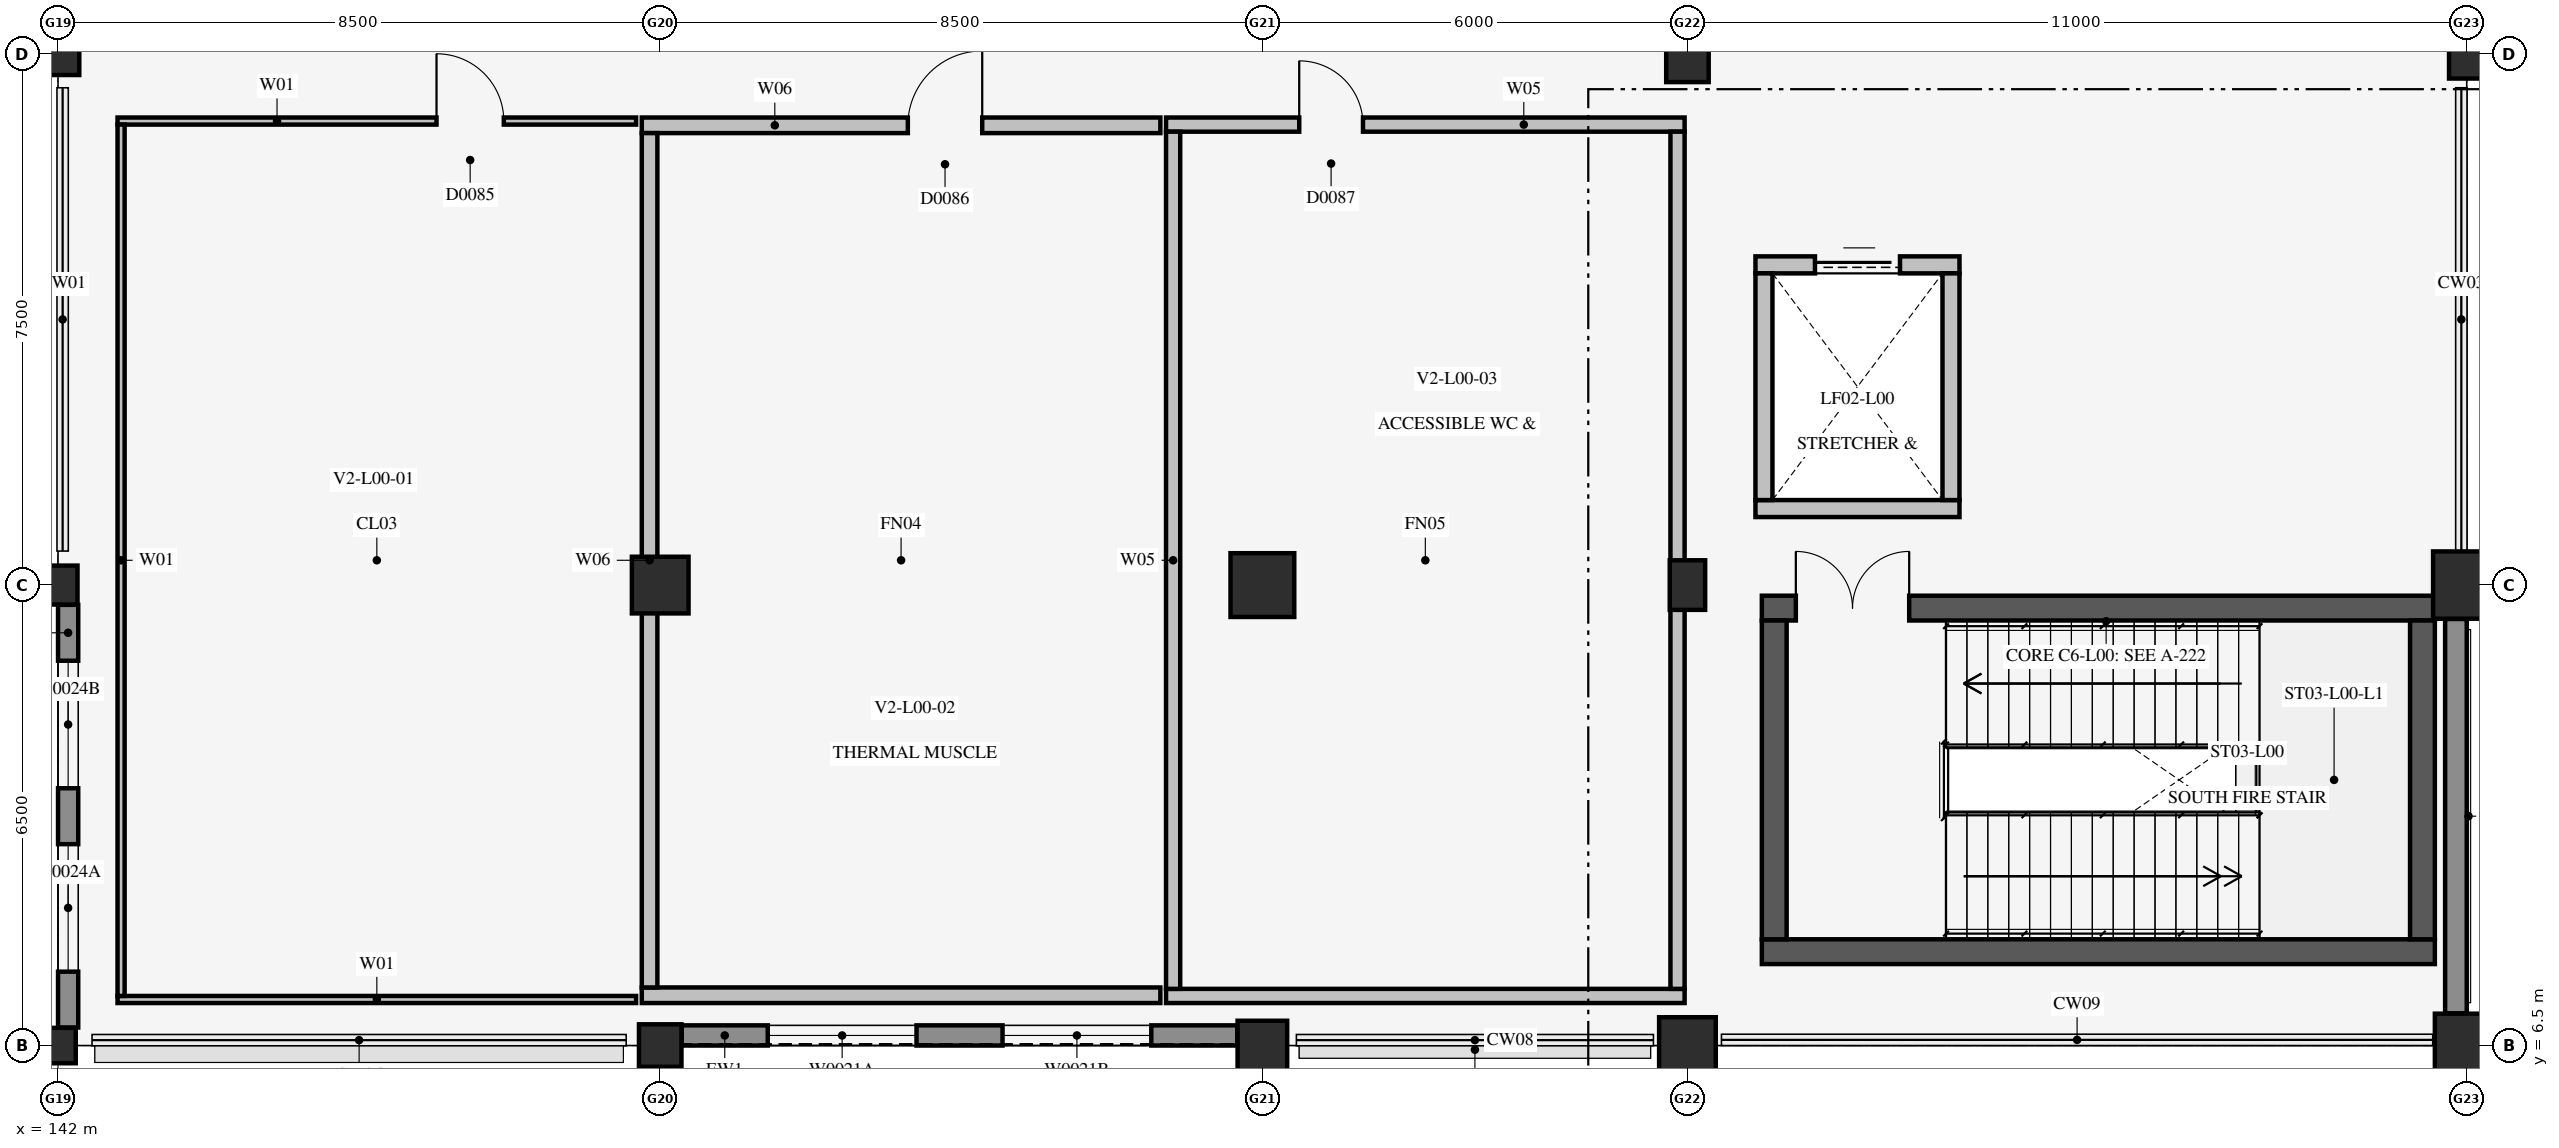
"""IFC4 building model, lengths in metres.
Left out: names, types, materials, properties, quantities, classifications, styles, units other than length and angle.
Written with IfcOpenShell. Run it as: python <this file> out.ifc"""

import sys

from ifc_helpers import new_model, si_unit, direction, frame, frame_2d, origin, origin_2d, place, context, subcontext, project, spatial, rectangle, extrude, element, fill, save


model = new_model("IFC4")
c1 = context("Model", 3, precision=1e-05, world=origin(), true_north=direction((0.0, 1.0)))
c2 = subcontext(c1, "Body", "Model", "MODEL_VIEW")
j1 = project(units=[si_unit("LENGTHUNIT", "METRE"), si_unit("PLANEANGLEUNIT", "RADIAN")], contexts=[c1])
p1 = place(None, origin())
s1 = spatial("IfcSite", under=j1, at=p1, CompositionType="ELEMENT")
p2 = place(p1, origin())
s2 = spatial("IfcBuilding", under=s1, at=p2, CompositionType="ELEMENT")
p3 = place(p2, origin())
s3 = spatial("IfcBuildingStorey", under=s2, at=p3, CompositionType="ELEMENT", Elevation=0.0)
p4 = place(p3, frame((166.05, 7.825, 0.0), z_axis=(0.0, 0.0, 1.0), x_axis=(1.0, 0.0, 0.0)))
e1 = element("IfcWall", 1, at=p4, inside=s3, PredefinedType="SHEAR", context=c2, shape_type="SweptSolid", body=[
    extrude(rectangle(XDim=9.5, YDim=0.35, at=frame_2d((4.75, 0.0))), origin(), (0.0, 0.0, 1.0), 5.14),
])
p5 = place(p3, frame((166.05, 12.675, 0.0), z_axis=(0.0, 0.0, 1.0), x_axis=(1.0, 0.0, 0.0)))
e2 = element("IfcWall", 2, at=p5, inside=s3, PredefinedType="SHEAR", context=c2, shape_type="SweptSolid", body=[
    extrude(rectangle(XDim=9.5, YDim=0.35, at=frame_2d((4.75, 0.0))), origin(), (0.0, 0.0, 1.0), 5.14),
])
p6 = place(p5, frame((0.48, 0.0, 0.0)))
e3 = element("IfcOpeningElement", 3, at=p6, cuts=e2, PredefinedType="OPENING", context=c2, shape_type="SweptSolid", body=[
    extrude(rectangle(XDim=1.6, YDim=2.2, at=frame_2d((0.8, 1.1))), frame((0.0, 0.187, 0.0), z_axis=(0.0, -1.0, 0.0), x_axis=(1.0, 0.0, 0.0)), (0.0, 0.0, 1.0), 0.374),
])
for number, where, z_axis, x_axis in (
    (4, (166.225, 8.0, 0.0), (0.0, 0.0, 1.0), (0.0, 1.0, 0.0)),
    (5, (175.375, 8.0, 0.0), (0.0, 0.0, 1.0), (0.0, 1.0, 0.0)),
):
    element("IfcWall", number, at=place(p3, frame(where, z_axis=z_axis, x_axis=x_axis)), inside=s3, PredefinedType="SHEAR", context=c2, shape_type="SweptSolid", body=[
        extrude(rectangle(XDim=4.5, YDim=0.35, at=frame_2d((2.25, 0.0))), origin(), (0.0, 0.0, 1.0), 5.14),
    ])
p7 = place(p3, frame((165.96, 14.08, 0.0), z_axis=(0.0, 0.0, 1.0), x_axis=(1.0, 0.0, 0.0)))
e6 = element("IfcWall", 6, at=p7, inside=s3, PredefinedType="SOLIDWALL", context=c2, shape_type="SweptSolid", body=[
    extrude(rectangle(XDim=2.88, YDim=0.24, at=frame_2d((1.44, 0.0))), origin(), (0.0, 0.0, 1.0), 5.4),
])
p8 = place(p3, frame((165.96, 17.52, 0.0), z_axis=(0.0, 0.0, 1.0), x_axis=(1.0, 0.0, 0.0)))
e7 = element("IfcWall", 7, at=p8, inside=s3, PredefinedType="SOLIDWALL", context=c2, shape_type="SweptSolid", body=[
    extrude(rectangle(XDim=2.88, YDim=0.24, at=frame_2d((1.44, 0.0))), origin(), (0.0, 0.0, 1.0), 5.4),
])
p9 = place(p8, frame((0.84, 0.0, 0.0)))
e8 = element("IfcOpeningElement", 8, at=p9, cuts=e7, PredefinedType="OPENING", context=c2, shape_type="SweptSolid", body=[
    extrude(rectangle(XDim=1.2, YDim=2.2, at=frame_2d((0.6, 1.1))), frame((0.0, 0.132, 0.0), z_axis=(0.0, -1.0, 0.0), x_axis=(1.0, 0.0, 0.0)), (0.0, 0.0, 1.0), 0.264),
])
for number, where, z_axis, x_axis in (
    (9, (166.08, 14.2, 0.0), (0.0, 0.0, 1.0), (0.0, 1.0, 0.0)),
    (10, (168.72, 14.2, 0.0), (0.0, 0.0, 1.0), (0.0, 1.0, 0.0)),
):
    element("IfcWall", number, at=place(p3, frame(where, z_axis=z_axis, x_axis=x_axis)), inside=s3, PredefinedType="SOLIDWALL", context=c2, shape_type="SweptSolid", body=[
        extrude(rectangle(XDim=3.2, YDim=0.24, at=frame_2d((1.6, 0.0))), origin(), (0.0, 0.0, 1.0), 5.4),
    ])
p10 = place(p3, frame((142.0, 6.5, 0.0), z_axis=(0.0, 0.0, 1.0), x_axis=(1.0, 0.0, 0.0)))
e11 = element("IfcColumn", 11, at=p10, inside=s3, PredefinedType="COLUMN", context=c2, shape_type="SweptSolid", body=[
    extrude(rectangle(XDim=0.5, YDim=0.5, at=origin_2d()), origin(), (0.0, 0.0, 1.0), 5.4),
])
p11 = place(p3, frame((142.0, 13.0, 0.0), z_axis=(0.0, 0.0, 1.0), x_axis=(1.0, 0.0, 0.0)))
e12 = element("IfcColumn", 12, at=p11, inside=s3, PredefinedType="COLUMN", context=c2, shape_type="SweptSolid", body=[
    extrude(rectangle(XDim=0.55, YDim=0.55, at=origin_2d()), origin(), (0.0, 0.0, 1.0), 5.4),
])
for number, where, z_axis, x_axis in (
    (13, (142.0, 20.5, 0.0), (0.0, 0.0, 1.0), (1.0, 0.0, 0.0)),
    (14, (150.5, 6.5, 0.0), (0.0, 0.0, 1.0), (1.0, 0.0, 0.0)),
):
    element("IfcColumn", number, at=place(p3, frame(where, z_axis=z_axis, x_axis=x_axis)), inside=s3, PredefinedType="COLUMN", context=c2, shape_type="SweptSolid", body=[
        extrude(rectangle(XDim=0.6, YDim=0.6, at=origin_2d()), origin(), (0.0, 0.0, 1.0), 5.4),
    ])
p12 = place(p3, frame((150.5, 13.0, 0.0), z_axis=(0.0, 0.0, 1.0), x_axis=(1.0, 0.0, 0.0)))
e15 = element("IfcColumn", 15, at=p12, inside=s3, PredefinedType="COLUMN", context=c2, shape_type="SweptSolid", body=[
    extrude(rectangle(XDim=0.8, YDim=0.8, at=origin_2d()), origin(), (0.0, 0.0, 1.0), 5.4),
])
p13 = place(p3, frame((159.0, 6.5, 0.0), z_axis=(0.0, 0.0, 1.0), x_axis=(1.0, 0.0, 0.0)))
e16 = element("IfcColumn", 16, at=p13, inside=s3, PredefinedType="COLUMN", context=c2, shape_type="SweptSolid", body=[
    extrude(rectangle(XDim=0.7, YDim=0.7, at=origin_2d()), origin(), (0.0, 0.0, 1.0), 5.4),
])
p14 = place(p3, frame((159.0, 13.0, 0.0), z_axis=(0.0, 0.0, 1.0), x_axis=(1.0, 0.0, 0.0)))
e17 = element("IfcColumn", 17, at=p14, inside=s3, PredefinedType="COLUMN", context=c2, shape_type="SweptSolid", body=[
    extrude(rectangle(XDim=0.9, YDim=0.9, at=origin_2d()), origin(), (0.0, 0.0, 1.0), 5.4),
])
p15 = place(p3, frame((165.0, 6.5, 0.0), z_axis=(0.0, 0.0, 1.0), x_axis=(1.0, 0.0, 0.0)))
e18 = element("IfcColumn", 18, at=p15, inside=s3, PredefinedType="COLUMN", context=c2, shape_type="SweptSolid", body=[
    extrude(rectangle(XDim=0.8, YDim=0.8, at=origin_2d()), origin(), (0.0, 0.0, 1.0), 5.4),
])
p16 = place(p3, frame((165.0, 13.0, 0.0), z_axis=(0.0, 0.0, 1.0), x_axis=(1.0, 0.0, 0.0)))
e19 = element("IfcColumn", 19, at=p16, inside=s3, PredefinedType="COLUMN", context=c2, shape_type="SweptSolid", body=[
    extrude(rectangle(XDim=0.5, YDim=0.7, at=origin_2d()), origin(), (0.0, 0.0, 1.0), 5.4),
])
p17 = place(p3, frame((165.0, 20.5, 0.0), z_axis=(0.0, 0.0, 1.0), x_axis=(1.0, 0.0, 0.0)))
e20 = element("IfcColumn", 20, at=p17, inside=s3, PredefinedType="COLUMN", context=c2, shape_type="SweptSolid", body=[
    extrude(rectangle(XDim=0.6, YDim=0.8, at=origin_2d()), origin(), (0.0, 0.0, 1.0), 5.4),
])
p18 = place(p3, frame((176.0, 6.5, 0.0), z_axis=(0.0, 0.0, 1.0), x_axis=(1.0, 0.0, 0.0)))
e21 = element("IfcColumn", 21, at=p18, inside=s3, PredefinedType="COLUMN", context=c2, shape_type="SweptSolid", body=[
    extrude(rectangle(XDim=0.9, YDim=0.9, at=origin_2d()), origin(), (0.0, 0.0, 1.0), 5.4),
])
p19 = place(p3, frame((176.0, 13.0, 0.0), z_axis=(0.0, 0.0, 1.0), x_axis=(1.0, 0.0, 0.0)))
e22 = element("IfcColumn", 22, at=p19, inside=s3, PredefinedType="COLUMN", context=c2, shape_type="SweptSolid", body=[
    extrude(rectangle(XDim=0.95, YDim=0.95, at=origin_2d()), origin(), (0.0, 0.0, 1.0), 5.4),
])
p20 = place(p3, frame((176.0, 20.5, 0.0), z_axis=(0.0, 0.0, 1.0), x_axis=(1.0, 0.0, 0.0)))
e23 = element("IfcColumn", 23, at=p20, inside=s3, PredefinedType="COLUMN", context=c2, shape_type="SweptSolid", body=[
    extrude(rectangle(XDim=0.5, YDim=0.7, at=origin_2d()), origin(), (0.0, 0.0, 1.0), 5.4),
])
p21 = place(p3, frame((142.84, 7.15, 0.0), z_axis=(0.0, 0.0, 1.0), x_axis=(1.0, 0.0, 0.0)))
e24 = element("IfcWall", 24, at=p21, inside=s3, PredefinedType="PARTITIONING", context=c2, shape_type="SweptSolid", body=[
    extrude(rectangle(XDim=7.32, YDim=0.1, at=frame_2d((3.66, 0.0))), origin(), (0.0, 0.0, 1.0), 5.125),
])
p22 = place(p3, frame((142.84, 19.55, 0.0), z_axis=(0.0, 0.0, 1.0), x_axis=(1.0, 0.0, 0.0)))
e25 = element("IfcWall", 25, at=p22, inside=s3, PredefinedType="PARTITIONING", context=c2, shape_type="SweptSolid", body=[
    extrude(rectangle(XDim=7.32, YDim=0.1, at=frame_2d((3.66, 0.0))), origin(), (0.0, 0.0, 1.0), 5.125),
])
p23 = place(p22, frame((4.502, 0.0, 0.0)))
e26 = element("IfcOpeningElement", 26, at=p23, cuts=e25, PredefinedType="OPENING", context=c2, shape_type="SweptSolid", body=[
    extrude(rectangle(XDim=0.95, YDim=2.15, at=frame_2d((0.475, 1.075))), frame((0.0, 0.062, 0.0), z_axis=(0.0, -1.0, 0.0), x_axis=(1.0, 0.0, 0.0)), (0.0, 0.0, 1.0), 0.124),
])
p24 = place(p3, frame((142.89, 7.2, 0.0), z_axis=(0.0, 0.0, 1.0), x_axis=(0.0, 1.0, 0.0)))
e27 = element("IfcWall", 27, at=p24, inside=s3, PredefinedType="PARTITIONING", context=c2, shape_type="SweptSolid", body=[
    extrude(rectangle(XDim=12.3, YDim=0.1, at=frame_2d((6.15, 0.0))), origin(), (0.0, 0.0, 1.0), 5.125),
])
p25 = place(p3, frame((150.24, 7.21, 0.0), z_axis=(0.0, 0.0, 1.0), x_axis=(1.0, 0.0, 0.0)))
e28 = element("IfcWall", 28, at=p25, inside=s3, PredefinedType="PLUMBINGWALL", context=c2, shape_type="SweptSolid", body=[
    extrude(rectangle(XDim=7.32, YDim=0.22, at=frame_2d((3.66, 0.0))), origin(), (0.0, 0.0, 1.0), 5.125),
])
p26 = place(p3, frame((150.24, 19.49, 0.0), z_axis=(0.0, 0.0, 1.0), x_axis=(1.0, 0.0, 0.0)))
e29 = element("IfcWall", 29, at=p26, inside=s3, PredefinedType="PLUMBINGWALL", context=c2, shape_type="SweptSolid", body=[
    extrude(rectangle(XDim=7.32, YDim=0.22, at=frame_2d((3.66, 0.0))), origin(), (0.0, 0.0, 1.0), 5.125),
])
p27 = place(p26, frame((3.755, 0.0, 0.0)))
e30 = element("IfcOpeningElement", 30, at=p27, cuts=e29, PredefinedType="OPENING", context=c2, shape_type="SweptSolid", body=[
    extrude(rectangle(XDim=1.05, YDim=2.15, at=frame_2d((0.525, 1.075))), frame((0.0, 0.122, 0.0), z_axis=(0.0, -1.0, 0.0), x_axis=(1.0, 0.0, 0.0)), (0.0, 0.0, 1.0), 0.244),
])
p28 = place(p3, frame((150.35, 7.32, 0.0), z_axis=(0.0, 0.0, 1.0), x_axis=(0.0, 1.0, 0.0)))
e31 = element("IfcWall", 31, at=p28, inside=s3, PredefinedType="PLUMBINGWALL", context=c2, shape_type="SweptSolid", body=[
    extrude(rectangle(XDim=12.06, YDim=0.22, at=frame_2d((6.03, 0.0))), origin(), (0.0, 0.0, 1.0), 4.503),
])
p29 = place(p3, frame((157.64, 7.2, 0.0), z_axis=(0.0, 0.0, 1.0), x_axis=(1.0, 0.0, 0.0)))
e32 = element("IfcWall", 32, at=p29, inside=s3, PredefinedType="PLUMBINGWALL", context=c2, shape_type="SweptSolid", body=[
    extrude(rectangle(XDim=7.32, YDim=0.2, at=frame_2d((3.66, 0.0))), origin(), (0.0, 0.0, 1.0), 5.125),
])
p30 = place(p3, frame((157.64, 19.5, 0.0), z_axis=(0.0, 0.0, 1.0), x_axis=(1.0, 0.0, 0.0)))
e33 = element("IfcWall", 33, at=p30, inside=s3, PredefinedType="PLUMBINGWALL", context=c2, shape_type="SweptSolid", body=[
    extrude(rectangle(XDim=7.32, YDim=0.2, at=frame_2d((3.66, 0.0))), origin(), (0.0, 0.0, 1.0), 5.125),
])
p31 = place(p30, frame((1.88, 0.0, 0.0)))
e34 = element("IfcOpeningElement", 34, at=p31, cuts=e33, PredefinedType="OPENING", context=c2, shape_type="SweptSolid", body=[
    extrude(rectangle(XDim=0.9, YDim=2.1, at=frame_2d((0.45, 1.05))), frame((0.0, 0.112, 0.0), z_axis=(0.0, -1.0, 0.0), x_axis=(1.0, 0.0, 0.0)), (0.0, 0.0, 1.0), 0.224),
])
p32 = place(p3, frame((164.86, 7.3, 0.0), z_axis=(0.0, 0.0, 1.0), x_axis=(0.0, 1.0, 0.0)))
e35 = element("IfcWall", 35, at=p32, inside=s3, PredefinedType="PLUMBINGWALL", context=c2, shape_type="SweptSolid", body=[
    extrude(rectangle(XDim=12.1, YDim=0.2, at=frame_2d((6.05, 0.0))), origin(), (0.0, 0.0, 1.0), 4.409),
])
p33 = place(p3, frame((157.74, 7.3, 0.0), z_axis=(0.0, 0.0, 1.0), x_axis=(0.0, 1.0, 0.0)))
e36 = element("IfcWall", 36, at=p33, inside=s3, PredefinedType="PLUMBINGWALL", context=c2, shape_type="SweptSolid", body=[
    extrude(rectangle(XDim=12.1, YDim=0.2, at=frame_2d((6.05, 0.0))), origin(), (0.0, 0.0, 1.0), 5.125),
])
p34 = place(p3, frame((150.804, 6.643, 0.0), z_axis=(0.0, 0.0, 1.0), x_axis=(1.0, 0.0, 0.0)))
e37 = element("IfcWall", 37, at=p34, inside=s3, PredefinedType="SOLIDWALL", context=c2, shape_type="SweptSolid", body=[
    extrude(rectangle(XDim=7.842, YDim=0.285, at=frame_2d((3.921, 0.0))), origin(), (0.0, 0.0, 1.0), 4.574),
])
p35 = place(p34, frame((1.214, 0.0, 0.95)))
e38 = element("IfcOpeningElement", 38, at=p35, cuts=e37, PredefinedType="OPENING", context=c2, shape_type="SweptSolid", body=[
    extrude(rectangle(XDim=2.1, YDim=1.5, at=frame_2d((1.05, 0.75))), frame((0.0, 0.154, 0.0), z_axis=(0.0, -1.0, 0.0), x_axis=(1.0, 0.0, 0.0)), (0.0, 0.0, 1.0), 0.309),
])
p36 = place(p34, frame((4.528, 0.0, 0.95)))
e39 = element("IfcOpeningElement", 39, at=p36, cuts=e37, PredefinedType="OPENING", context=c2, shape_type="SweptSolid", body=[
    extrude(rectangle(XDim=2.1, YDim=1.5, at=frame_2d((1.05, 0.75))), frame((0.0, 0.154, 0.0), z_axis=(0.0, -1.0, 0.0), x_axis=(1.0, 0.0, 0.0)), (0.0, 0.0, 1.0), 0.309),
])
p37 = place(p3, frame((142.143, 6.754, 0.0), z_axis=(0.0, 0.0, 1.0), x_axis=(0.0, 1.0, 0.0)))
e40 = element("IfcWall", 40, at=p37, inside=s3, PredefinedType="SOLIDWALL", context=c2, shape_type="SweptSolid", body=[
    extrude(rectangle(XDim=5.967, YDim=0.285, at=frame_2d((2.983, 0.0))), origin(), (0.0, 0.0, 1.0), 4.574),
])
p38 = place(p37, frame((0.789, 0.0, 0.95)))
e41 = element("IfcOpeningElement", 41, at=p38, cuts=e40, PredefinedType="OPENING", context=c2, shape_type="SweptSolid", body=[
    extrude(rectangle(XDim=1.8, YDim=1.8, at=frame_2d((0.9, 0.9))), frame((0.0, 0.154, 0.0), z_axis=(0.0, -1.0, 0.0), x_axis=(1.0, 0.0, 0.0)), (0.0, 0.0, 1.0), 0.309),
])
p39 = place(p37, frame((3.378, 0.0, 0.95)))
e42 = element("IfcOpeningElement", 42, at=p39, cuts=e40, PredefinedType="OPENING", context=c2, shape_type="SweptSolid", body=[
    extrude(rectangle(XDim=1.8, YDim=1.8, at=frame_2d((0.9, 0.9))), frame((0.0, 0.154, 0.0), z_axis=(0.0, -1.0, 0.0), x_axis=(1.0, 0.0, 0.0)), (0.0, 0.0, 1.0), 0.309),
])
p40 = place(p3, frame((175.847, 6.954, 0.0), z_axis=(0.0, 0.0, 1.0), x_axis=(0.0, 1.0, 0.0)))
e43 = element("IfcWall", 43, at=p40, inside=s3, PredefinedType="SOLIDWALL", context=c2, shape_type="SweptSolid", body=[
    extrude(rectangle(XDim=5.567, YDim=0.305, at=frame_2d((2.783, 0.0))), origin(), (0.0, 0.0, 1.0), 4.574),
])
p41 = place(p6, origin())
e44 = element("IfcDoor", 44, at=p41, inside=s3, OperationType="DOUBLE_DOOR_SINGLE_SWING", PredefinedType="DOOR", context=c2, shape_type="SweptSolid", body=[
    extrude(rectangle(XDim=1.6, YDim=2.2, at=frame_2d((0.8, 1.1))), frame((0.0, 0.025, 0.0), z_axis=(0.0, -1.0, 0.0), x_axis=(1.0, 0.0, 0.0)), (0.0, 0.0, 1.0), 0.05),
])
fill(e3, e44)
p42 = place(p23, frame((0.95, 0.0, 0.0), z_axis=(0.0, 0.0, 1.0), x_axis=(-1.0, 0.0, 0.0)))
e45 = element("IfcDoor", 45, at=p42, inside=s3, OperationType="SINGLE_SWING_LEFT", PredefinedType="DOOR", context=c2, shape_type="SweptSolid", body=[
    extrude(rectangle(XDim=0.95, YDim=2.15, at=frame_2d((0.475, 1.075))), frame((0.0, 0.025, 0.0), z_axis=(0.0, -1.0, 0.0), x_axis=(1.0, 0.0, 0.0)), (0.0, 0.0, 1.0), 0.05),
])
fill(e26, e45)
p43 = place(p27, frame((1.05, 0.0, 0.0), z_axis=(0.0, 0.0, 1.0), x_axis=(-1.0, 0.0, 0.0)))
e46 = element("IfcDoor", 46, at=p43, inside=s3, OperationType="SINGLE_SWING_RIGHT", PredefinedType="DOOR", context=c2, shape_type="SweptSolid", body=[
    extrude(rectangle(XDim=1.05, YDim=2.15, at=frame_2d((0.525, 1.075))), frame((0.0, 0.025, 0.0), z_axis=(0.0, -1.0, 0.0), x_axis=(1.0, 0.0, 0.0)), (0.0, 0.0, 1.0), 0.05),
])
fill(e30, e46)
p44 = place(p31, frame((0.9, 0.0, 0.0), z_axis=(0.0, 0.0, 1.0), x_axis=(-1.0, 0.0, 0.0)))
e47 = element("IfcDoor", 47, at=p44, inside=s3, OperationType="SINGLE_SWING_LEFT", PredefinedType="DOOR", context=c2, shape_type="SweptSolid", body=[
    extrude(rectangle(XDim=0.9, YDim=2.1, at=frame_2d((0.45, 1.05))), frame((0.0, 0.025, 0.0), z_axis=(0.0, -1.0, 0.0), x_axis=(1.0, 0.0, 0.0)), (0.0, 0.0, 1.0), 0.05),
])
fill(e34, e47)
p45 = place(p35, origin())
e48 = element("IfcWindow", 48, at=p45, inside=s3, PartitioningType="SINGLE_PANEL", PredefinedType="WINDOW", context=c2, shape_type="SweptSolid", body=[
    extrude(rectangle(XDim=2.1, YDim=1.5, at=frame_2d((1.05, 0.75))), frame((0.0, 0.03, 0.0), z_axis=(0.0, -1.0, 0.0), x_axis=(1.0, 0.0, 0.0)), (0.0, 0.0, 1.0), 0.06),
])
fill(e38, e48)
p46 = place(p36, origin())
e49 = element("IfcWindow", 49, at=p46, inside=s3, PartitioningType="SINGLE_PANEL", PredefinedType="WINDOW", context=c2, shape_type="SweptSolid", body=[
    extrude(rectangle(XDim=2.1, YDim=1.5, at=frame_2d((1.05, 0.75))), frame((0.0, 0.03, 0.0), z_axis=(0.0, -1.0, 0.0), x_axis=(1.0, 0.0, 0.0)), (0.0, 0.0, 1.0), 0.06),
])
fill(e39, e49)
p47 = place(p38, origin())
e50 = element("IfcWindow", 50, at=p47, inside=s3, PartitioningType="SINGLE_PANEL", PredefinedType="WINDOW", context=c2, shape_type="SweptSolid", body=[
    extrude(rectangle(XDim=1.8, YDim=1.8, at=frame_2d((0.9, 0.9))), frame((0.0, 0.03, 0.0), z_axis=(0.0, -1.0, 0.0), x_axis=(1.0, 0.0, 0.0)), (0.0, 0.0, 1.0), 0.06),
])
fill(e41, e50)
p48 = place(p39, origin())
e51 = element("IfcWindow", 51, at=p48, inside=s3, PartitioningType="SINGLE_PANEL", PredefinedType="WINDOW", context=c2, shape_type="SweptSolid", body=[
    extrude(rectangle(XDim=1.8, YDim=1.8, at=frame_2d((0.9, 0.9))), frame((0.0, 0.03, 0.0), z_axis=(0.0, -1.0, 0.0), x_axis=(1.0, 0.0, 0.0)), (0.0, 0.0, 1.0), 0.06),
])
fill(e42, e51)
p49 = place(p9, origin())
e52 = element("IfcDoor", 52, at=p49, inside=s3, OperationType="SLIDING_TO_RIGHT", PredefinedType="USERDEFINED", context=c2, shape_type="SweptSolid", body=[
    extrude(rectangle(XDim=1.2, YDim=2.2, at=frame_2d((0.6, 1.1))), frame((0.0, 0.025, 0.0), z_axis=(0.0, -1.0, 0.0), x_axis=(1.0, 0.0, 0.0)), (0.0, 0.0, 1.0), 0.05),
])
fill(e8, e52)
save(model, sys.argv[1])
